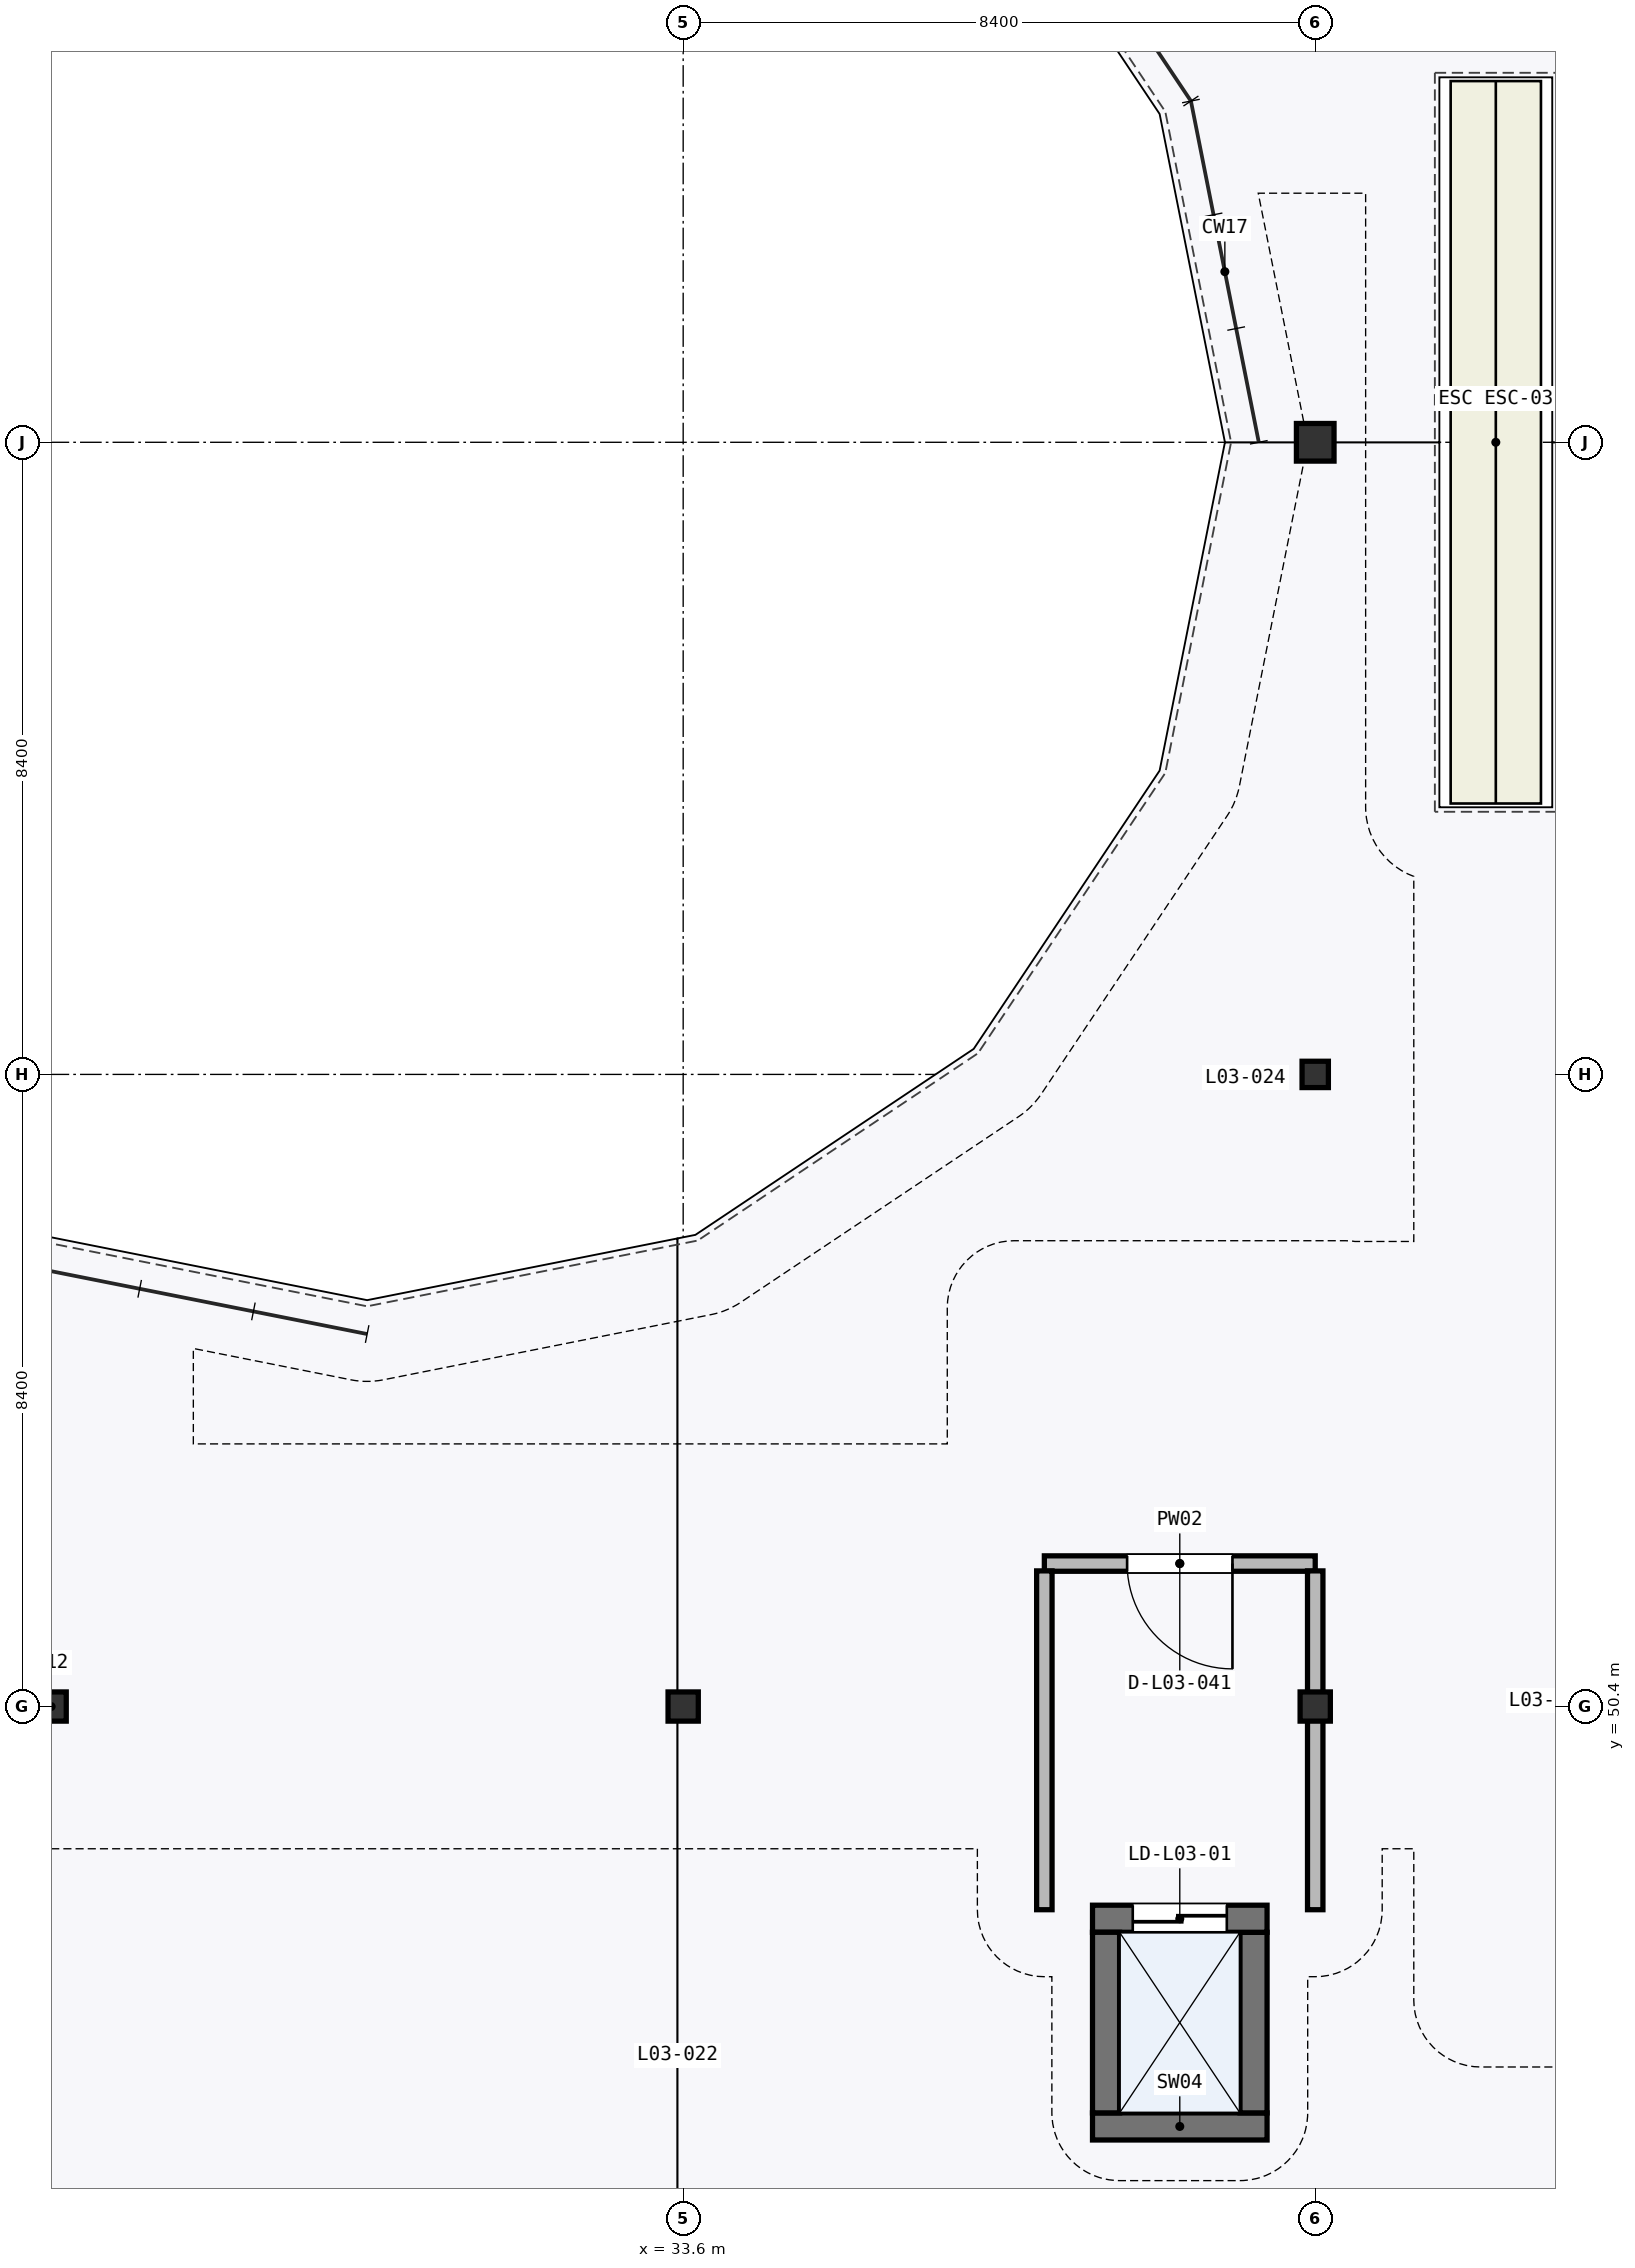
"""IFC4 building model, lengths in metres.
Left out: names, types, materials, properties, quantities, classifications, styles, units other than length and angle.
Written with IfcOpenShell. Run it as: python <this file> out.ifc"""

import sys

from ifc_helpers import new_model, si_unit, direction, frame, frame_2d, origin, origin_2d, place, context, subcontext, project, spatial, rectangle, hollow_rectangle, i_section, extrude, element, fill, save


model = new_model("IFC4")
c1 = context("Model", 3, precision=1e-05, world=origin(), true_north=direction((0.0, 1.0)))
c2 = subcontext(c1, "Body", "Model", "MODEL_VIEW")
j1 = project(units=[si_unit("LENGTHUNIT", "METRE"), si_unit("PLANEANGLEUNIT", "RADIAN")], contexts=[c1])
p1 = place(None, origin())
s1 = spatial("IfcSite", under=j1, at=p1, CompositionType="ELEMENT")
p2 = place(p1, origin())
s2 = spatial("IfcBuilding", under=s1, at=p2, CompositionType="ELEMENT")
p3 = place(p2, frame((0.0, 0.0, 11.4)))
s3 = spatial("IfcBuildingStorey", under=s2, at=p3, CompositionType="ELEMENT", Elevation=11.4)
for number, where, z_axis, x_axis in (
    (1, (25.2, 50.4, 0.0), (0.0, 0.0, 1.0), (1.0, 0.0, 0.0)),
    (2, (33.6, 50.4, 0.0), (0.0, 0.0, 1.0), (1.0, 0.0, 0.0)),
    (3, (42.0, 50.4, 0.0), (0.0, 0.0, 1.0), (1.0, 0.0, 0.0)),
):
    element("IfcColumn", number, at=place(p3, frame(where, z_axis=z_axis, x_axis=x_axis)), inside=s3, PredefinedType="COLUMN", context=c2, shape_type="SweptSolid", body=[
        extrude(i_section(OverallWidth=0.402, OverallDepth=0.388, WebThickness=0.015, FlangeThickness=0.015, FilletRadius=0.022, at=origin_2d()), origin(), (0.0, 0.0, 1.0), 5.1),
    ])
p4 = place(p3, frame((42.0, 58.8, 0.0), z_axis=(0.0, 0.0, 1.0), x_axis=(1.0, 0.0, 0.0)))
e4 = element("IfcColumn", 4, at=p4, inside=s3, PredefinedType="COLUMN", context=c2, shape_type="SweptSolid", body=[
    extrude(i_section(OverallWidth=0.35, OverallDepth=0.35, WebThickness=0.012, FlangeThickness=0.019, FilletRadius=0.02, at=origin_2d()), origin(), (0.0, 0.0, 1.0), 5.1),
])
p5 = place(p3, frame((42.0, 67.2, 0.0), z_axis=(0.0, 0.0, 1.0), x_axis=(1.0, 0.0, 0.0)))
e5 = element("IfcColumn", 5, at=p5, inside=s3, PredefinedType="COLUMN", context=c2, shape_type="SweptSolid", body=[
    extrude(hollow_rectangle(XDim=0.5, YDim=0.5, WallThickness=0.02, at=origin_2d()), origin(), (0.0, 0.0, 1.0), 5.1),
])
p6 = place(p3, frame((39.04, 44.82, 0.0), z_axis=(0.0, 0.0, 1.0), x_axis=(1.0, 0.0, 0.0)))
e6 = element("IfcWall", 6, at=p6, inside=s3, PredefinedType="SHEAR", context=c2, shape_type="SweptSolid", body=[
    extrude(rectangle(XDim=2.32, YDim=0.36, at=frame_2d((1.16, 0.0))), origin(), (0.0, 0.0, 1.0), 4.845),
])
p7 = place(p3, frame((41.18, 45.0, 0.0), z_axis=(0.0, 0.0, 1.0), x_axis=(0.0, 1.0, 0.0)))
e7 = element("IfcWall", 7, at=p7, inside=s3, PredefinedType="SHEAR", context=c2, shape_type="SweptSolid", body=[
    extrude(rectangle(XDim=2.4, YDim=0.36, at=frame_2d((1.2, 0.0))), origin(), (0.0, 0.0, 1.0), 4.845),
])
p8 = place(p3, frame((41.36, 47.58, 0.0), z_axis=(0.0, 0.0, 1.0), x_axis=(-1.0, 0.0, 0.0)))
e8 = element("IfcWall", 8, at=p8, inside=s3, PredefinedType="SHEAR", context=c2, shape_type="SweptSolid", body=[
    extrude(rectangle(XDim=2.32, YDim=0.36, at=frame_2d((1.16, 0.0))), origin(), (0.0, 0.0, 1.0), 4.845),
])
p9 = place(p8, frame((0.535, 0.0, 0.0)))
e9 = element("IfcOpeningElement", 9, at=p9, cuts=e8, PredefinedType="OPENING", context=c2, shape_type="SweptSolid", body=[
    extrude(rectangle(XDim=1.25, YDim=2.2, at=frame_2d((0.625, 1.1))), frame((0.0, 0.19, 0.0), z_axis=(0.0, -1.0, 0.0), x_axis=(1.0, 0.0, 0.0)), (0.0, 0.0, 1.0), 0.38),
])
p10 = place(p3, frame((39.22, 47.4, 0.0), z_axis=(0.0, 0.0, 1.0), x_axis=(0.0, -1.0, 0.0)))
e10 = element("IfcWall", 10, at=p10, inside=s3, PredefinedType="SHEAR", context=c2, shape_type="SweptSolid", body=[
    extrude(rectangle(XDim=2.4, YDim=0.36, at=frame_2d((1.2, 0.0))), origin(), (0.0, 0.0, 1.0), 4.845),
])
p11 = place(p3, frame((42.0, 52.3, 0.0), z_axis=(0.0, 0.0, 1.0), x_axis=(-1.0, 0.0, 0.0)))
e11 = element("IfcWall", 11, at=p11, inside=s3, PredefinedType="PARTITIONING", context=c2, shape_type="SweptSolid", body=[
    extrude(rectangle(XDim=3.6, YDim=0.205, at=frame_2d((1.8, 0.0))), origin(), (0.0, 0.0, 1.0), 4.845),
])
p12 = place(p11, frame((1.1, 0.0, 0.0)))
e12 = element("IfcOpeningElement", 12, at=p12, cuts=e11, PredefinedType="OPENING", context=c2, shape_type="SweptSolid", body=[
    extrude(rectangle(XDim=1.4, YDim=2.15, at=frame_2d((0.7, 1.075))), frame((0.0, 0.113, 0.0), z_axis=(0.0, -1.0, 0.0), x_axis=(1.0, 0.0, 0.0)), (0.0, 0.0, 1.0), 0.225),
])
p13 = place(p3, frame((42.0, 47.7, 0.0), z_axis=(0.0, 0.0, 1.0), x_axis=(0.0, 1.0, 0.0)))
e13 = element("IfcWall", 13, at=p13, inside=s3, PredefinedType="PARTITIONING", context=c2, shape_type="SweptSolid", body=[
    extrude(rectangle(XDim=4.502, YDim=0.205, at=frame_2d((2.251, 0.0))), origin(), (0.0, 0.0, 1.0), 4.137),
])
p14 = place(p3, frame((38.4, 52.202, 0.0), z_axis=(0.0, 0.0, 1.0), x_axis=(0.0, -1.0, 0.0)))
e14 = element("IfcWall", 14, at=p14, inside=s3, PredefinedType="PARTITIONING", context=c2, shape_type="SweptSolid", body=[
    extrude(rectangle(XDim=4.502, YDim=0.205, at=frame_2d((2.251, 0.0))), origin(), (0.0, 0.0, 1.0), 4.845),
])
p15 = place(p9, frame((1.25, 0.0, 0.0), z_axis=(0.0, 0.0, 1.0), x_axis=(-1.0, 0.0, 0.0)))
e15 = element("IfcDoor", 15, at=p15, inside=s3, OperationType="DOUBLE_DOOR_SLIDING", PredefinedType="DOOR", context=c2, shape_type="SweptSolid", body=[
    extrude(rectangle(XDim=1.25, YDim=2.2, at=frame_2d((0.625, 1.1))), frame((0.0, 0.025, 0.0), z_axis=(0.0, -1.0, 0.0), x_axis=(1.0, 0.0, 0.0)), (0.0, 0.0, 1.0), 0.05),
])
fill(e9, e15)
p16 = place(p12, origin())
e16 = element("IfcDoor", 16, at=p16, inside=s3, OperationType="SINGLE_SWING_LEFT", PredefinedType="DOOR", context=c2, shape_type="SweptSolid", body=[
    extrude(rectangle(XDim=1.4, YDim=2.15, at=frame_2d((0.7, 1.075))), frame((0.0, 0.025, 0.0), z_axis=(0.0, -1.0, 0.0), x_axis=(1.0, 0.0, 0.0)), (0.0, 0.0, 1.0), 0.05),
])
fill(e12, e16)
save(model, sys.argv[1])
